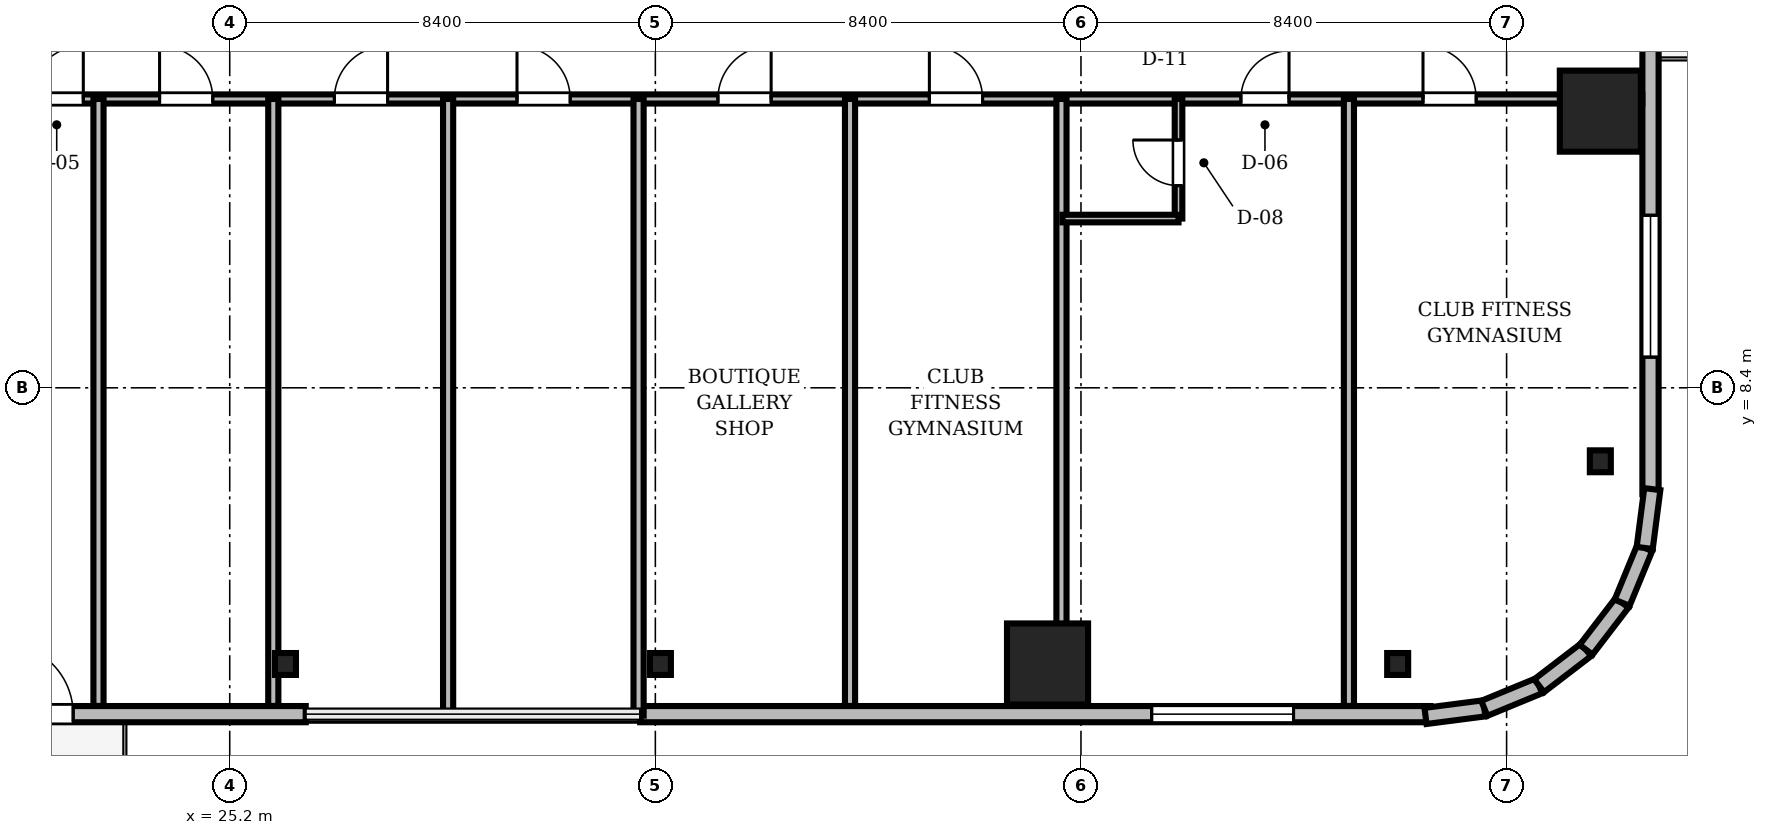
"""IFC4 building model, lengths in metres.
Left out: names, types, materials, properties, quantities, classifications, styles, units other than length and angle.
Written with IfcOpenShell. Run it as: python <this file> out.ifc"""

import sys

from ifc_helpers import new_model, si_unit, direction, frame, frame_2d, origin, origin_2d, place, context, subcontext, project, spatial, rectangle, i_section, extrude, source, transform, mapped, element, fill, save


model = new_model("IFC4")
c1 = context("Model", 3, precision=1e-05, world=origin(), true_north=direction((0.0, 1.0)))
c2 = subcontext(c1, "Body", "Model", "MODEL_VIEW")
j1 = project(units=[si_unit("LENGTHUNIT", "METRE"), si_unit("PLANEANGLEUNIT", "RADIAN")], contexts=[c1])
p1 = place(None, origin())
s1 = spatial("IfcSite", under=j1, at=p1, CompositionType="ELEMENT")
p2 = place(p1, origin())
s2 = spatial("IfcBuilding", under=s1, at=p2, CompositionType="ELEMENT")
p3 = place(p2, frame((0.0, 0.0, 126.1)))
s3 = spatial("IfcBuildingStorey", under=s2, at=p3, CompositionType="ELEMENT", Elevation=126.1)
m1 = source(origin(), c2, "Body", "SweptSolid", [
    extrude(rectangle(XDim=1.6, YDim=1.6, at=origin_2d()), origin(), (0.0, 0.0, 1.0), 3.46),
])
for number, where, z_axis, x_axis in (
    (1, (41.34, 2.95, 0.0), (0.0, 0.0, 1.0), (1.0, 0.0, 0.0)),
    (2, (52.25, 13.86, 0.0), (0.0, 0.0, 1.0), (1.0, 0.0, 0.0)),
):
    element("IfcColumn", number, at=place(p3, frame(where, z_axis=z_axis, x_axis=x_axis)), inside=s3, PredefinedType="COLUMN", context=c2, shape_type="MappedRepresentation", body=[
        mapped(m1, transform((0.0, 0.0, 0.0), scale=1.0)),
    ])
m2 = source(origin(), c2, "Body", "SweptSolid", [
    extrude(i_section(OverallWidth=0.414, OverallDepth=0.432, WebThickness=0.026, FlangeThickness=0.04, FilletRadius=0.015, at=origin_2d()), origin(), (0.0, 0.0, 1.0), 3.46),
])
for number, where, z_axis, x_axis in (
    (3, (26.3, 2.95, 0.0), (0.0, 0.0, 1.0), (1.0, 0.0, 0.0)),
    (4, (33.7, 2.95, 0.0), (0.0, 0.0, 1.0), (1.0, 0.0, 0.0)),
    (5, (48.25, 2.95, 0.0), (0.0, 0.0, 1.0), (1.0, 0.0, 0.0)),
    (6, (52.25, 6.95, 0.0), (0.0, 0.0, 1.0), (1.0, 0.0, 0.0)),
):
    element("IfcColumn", number, at=place(p3, frame(where, z_axis=z_axis, x_axis=x_axis)), inside=s3, PredefinedType="COLUMN", context=c2, shape_type="MappedRepresentation", body=[
        mapped(m2, transform((0.0, 0.0, 0.0), scale=1.0)),
    ])
m3 = source(origin(), c2, "Body", "SweptSolid", [
    extrude(rectangle(XDim=15.6, YDim=0.32, at=frame_2d((7.8, 0.0))), origin(), (0.0, 0.0, 1.0), 3.46),
])
p4 = place(p3, frame((11.1, 1.96, 0.0), z_axis=(0.0, 0.0, 1.0), x_axis=(1.0, 0.0, 0.0)))
e7 = element("IfcWall", 7, at=p4, inside=s3, PredefinedType="SOLIDWALL", context=c2, shape_type="MappedRepresentation", body=[
    mapped(m3, transform((0.0, 0.0, 0.0), scale=1.0)),
])
m4 = source(origin(), c2, "Body", "SweptSolid", [
    extrude(rectangle(XDim=1.4, YDim=2.3, at=frame_2d((0.7, 1.15))), frame((0.0, 0.17, 0.0), z_axis=(0.0, -1.0, 0.0), x_axis=(1.0, 0.0, 0.0)), (0.0, 0.0, 1.0), 0.34),
])
p5 = place(p4, frame((9.61, 0.0, 0.0)))
e8 = element("IfcOpeningElement", 8, at=p5, cuts=e7, PredefinedType="OPENING", context=c2, shape_type="MappedRepresentation", body=[
    mapped(m4, transform((0.0, 0.0, 0.0), scale=1.0)),
])
m5 = source(origin(), c2, "Body", "SweptSolid", [
    extrude(rectangle(XDim=2.8, YDim=2.4, at=frame_2d((1.4, 1.2))), frame((0.0, 0.17, 0.0), z_axis=(0.0, -1.0, 0.0), x_axis=(1.0, 0.0, 0.0)), (0.0, 0.0, 1.0), 0.34),
])
p6 = place(p4, frame((2.705, 0.0, 0.72)))
e9 = element("IfcOpeningElement", 9, at=p6, cuts=e7, PredefinedType="OPENING", context=c2, shape_type="MappedRepresentation", body=[
    mapped(m5, transform((0.0, 0.0, 0.0), scale=1.0)),
])
p7 = place(p3, frame((33.3, 1.96, 0.0), z_axis=(0.0, 0.0, 1.0), x_axis=(1.0, 0.0, 0.0)))
e10 = element("IfcWall", 10, at=p7, inside=s3, PredefinedType="SOLIDWALL", context=c2, shape_type="MappedRepresentation", body=[
    mapped(m3, transform((0.0, 0.0, 0.0), scale=1.0)),
])
p8 = place(p7, frame((10.095, 0.0, 0.72)))
e11 = element("IfcOpeningElement", 11, at=p8, cuts=e10, PredefinedType="OPENING", context=c2, shape_type="MappedRepresentation", body=[
    mapped(m5, transform((0.0, 0.0, 0.0), scale=1.0)),
])
p9 = place(p3, frame((53.24, 6.3, 0.0), z_axis=(0.0, 0.0, 1.0), x_axis=(0.0, 1.0, 0.0)))
e12 = element("IfcWall", 12, at=p9, inside=s3, PredefinedType="SOLIDWALL", context=c2, shape_type="MappedRepresentation", body=[
    mapped(m3, transform((0.0, 0.0, 0.0), scale=1.0)),
])
p10 = place(p9, frame((9.61, 0.0, 0.0)))
e13 = element("IfcOpeningElement", 13, at=p10, cuts=e12, PredefinedType="OPENING", context=c2, shape_type="MappedRepresentation", body=[
    mapped(m4, transform((0.0, 0.0, 0.0), scale=1.0)),
])
p11 = place(p9, frame((2.705, 0.0, 0.72)))
e14 = element("IfcOpeningElement", 14, at=p11, cuts=e12, PredefinedType="OPENING", context=c2, shape_type="MappedRepresentation", body=[
    mapped(m5, transform((0.0, 0.0, 0.0), scale=1.0)),
])
m6 = source(origin(), c2, "Body", "SweptSolid", [
    extrude(rectangle(XDim=1.17, YDim=0.32, at=frame_2d((0.585, 0.0))), origin(), (0.0, 0.0, 1.0), 3.46),
])
p12 = place(p3, frame((48.8, 1.925, 0.0), z_axis=(0.0, 0.0, 1.0), x_axis=(0.991762485493, 0.128090485085, 0.0)))
e15 = element("IfcWall", 15, at=p12, inside=s3, PredefinedType="SOLIDWALL", context=c2, shape_type="MappedRepresentation", body=[
    mapped(m6, transform((0.0, 0.0, 0.0), scale=1.0)),
])
m7 = source(origin(), c2, "Body", "SweptSolid", [
    extrude(rectangle(XDim=1.169, YDim=0.32, at=frame_2d((0.585, 0.0))), origin(), (0.0, 0.0, 1.0), 3.46),
])
p13 = place(p3, frame((49.96, 2.074, 0.0), z_axis=(0.0, 0.0, 1.0), x_axis=(0.924479075121, 0.381232789334, 0.0)))
e16 = element("IfcWall", 16, at=p13, inside=s3, PredefinedType="SOLIDWALL", context=c2, shape_type="MappedRepresentation", body=[
    mapped(m7, transform((0.0, 0.0, 0.0), scale=1.0)),
])
m8 = source(origin(), c2, "Body", "SweptSolid", [
    extrude(rectangle(XDim=1.169, YDim=0.32, at=frame_2d((0.584, 0.0))), origin(), (0.0, 0.0, 1.0), 3.46),
])
p14 = place(p3, frame((51.041, 2.52, 0.0), z_axis=(0.0, 0.0, 1.0), x_axis=(0.793663520347, 0.608356981114, 0.0)))
e17 = element("IfcWall", 17, at=p14, inside=s3, PredefinedType="SOLIDWALL", context=c2, shape_type="MappedRepresentation", body=[
    mapped(m8, transform((0.0, 0.0, 0.0), scale=1.0)),
])
m9 = source(origin(), c2, "Body", "SweptSolid", [
    extrude(rectangle(XDim=1.169, YDim=0.32, at=frame_2d((0.584, 0.0))), origin(), (0.0, 0.0, 1.0), 3.46),
])
for number, where, z_axis, x_axis in (
    (18, (51.969, 3.231, 0.0), (0.0, 0.0, 1.0), (0.608, 0.794, 0.0)),
    (19, (52.68, 4.159, 0.0), (0.0, 0.0, 1.0), (0.381, 0.925, 0.0)),
):
    element("IfcWall", number, at=place(p3, frame(where, z_axis=z_axis, x_axis=x_axis)), inside=s3, PredefinedType="SOLIDWALL", context=c2, shape_type="MappedRepresentation", body=[
        mapped(m9, transform((0.0, 0.0, 0.0), scale=1.0)),
    ])
m10 = source(origin(), c2, "Body", "SweptSolid", [
    extrude(rectangle(XDim=1.171, YDim=0.32, at=frame_2d((0.585, 0.0))), origin(), (0.0, 0.0, 1.0), 3.46),
])
p15 = place(p3, frame((53.125, 5.24, 0.0), z_axis=(0.0, 0.0, 1.0), x_axis=(0.128269133229, 0.991739395941, 0.0)))
e20 = element("IfcWall", 20, at=p15, inside=s3, PredefinedType="SOLIDWALL", context=c2, shape_type="MappedRepresentation", body=[
    mapped(m10, transform((0.0, 0.0, 0.0), scale=1.0)),
])
m11 = source(origin(), c2, "Body", "SweptSolid", [
    extrude(rectangle(XDim=46.156, YDim=0.18, at=frame_2d((23.078, 0.0))), origin(), (0.0, 0.0, 1.0), 2.702),
])
p16 = place(p3, frame((6.922, 14.1, 0.0), z_axis=(0.0, 0.0, 1.0), x_axis=(1.0, 0.0, 0.0)))
e21 = element("IfcWall", 21, at=p16, inside=s3, PredefinedType="PARTITIONING", context=c2, shape_type="MappedRepresentation", body=[
    mapped(m11, transform((0.0, 0.0, 0.0), scale=1.0)),
])
m12 = source(origin(), c2, "Body", "SweptSolid", [
    extrude(rectangle(XDim=1.05, YDim=2.2, at=frame_2d((0.525, 1.1))), frame((0.0, 0.1, 0.0), z_axis=(0.0, -1.0, 0.0), x_axis=(1.0, 0.0, 0.0)), (0.0, 0.0, 1.0), 0.2),
])
p17 = place(p16, frame((14.338, 0.0, 0.0)))
e22 = element("IfcOpeningElement", 22, at=p17, cuts=e21, PredefinedType="OPENING", context=c2, shape_type="MappedRepresentation", body=[
    mapped(m12, transform((0.0, 0.0, 0.0), scale=1.0)),
])
p18 = place(p16, frame((16.893, 0.0, 0.0)))
e23 = element("IfcOpeningElement", 23, at=p18, cuts=e21, PredefinedType="OPENING", context=c2, shape_type="MappedRepresentation", body=[
    mapped(m12, transform((0.0, 0.0, 0.0), scale=1.0)),
])
p19 = place(p16, frame((20.344, 0.0, 0.0)))
e24 = element("IfcOpeningElement", 24, at=p19, cuts=e21, PredefinedType="OPENING", context=c2, shape_type="MappedRepresentation", body=[
    mapped(m12, transform((0.0, 0.0, 0.0), scale=1.0)),
])
p20 = place(p16, frame((23.948, 0.0, 0.0)))
e25 = element("IfcOpeningElement", 25, at=p20, cuts=e21, PredefinedType="OPENING", context=c2, shape_type="MappedRepresentation", body=[
    mapped(m12, transform((0.0, 0.0, 0.0), scale=1.0)),
])
p21 = place(p16, frame((27.913, 0.0, 0.0)))
e26 = element("IfcOpeningElement", 26, at=p21, cuts=e21, PredefinedType="OPENING", context=c2, shape_type="MappedRepresentation", body=[
    mapped(m12, transform((0.0, 0.0, 0.0), scale=1.0)),
])
p22 = place(p16, frame((32.086, 0.0, 0.0)))
e27 = element("IfcOpeningElement", 27, at=p22, cuts=e21, PredefinedType="OPENING", context=c2, shape_type="MappedRepresentation", body=[
    mapped(m12, transform((0.0, 0.0, 0.0), scale=1.0)),
])
m13 = source(origin(), c2, "Body", "SweptSolid", [
    extrude(rectangle(XDim=0.95, YDim=2.15, at=frame_2d((0.475, 1.075))), frame((0.0, 0.1, 0.0), z_axis=(0.0, -1.0, 0.0), x_axis=(1.0, 0.0, 0.0)), (0.0, 0.0, 1.0), 0.2),
])
p23 = place(p16, frame((38.234, 0.0, 0.0)))
e28 = element("IfcOpeningElement", 28, at=p23, cuts=e21, PredefinedType="OPENING", context=c2, shape_type="MappedRepresentation", body=[
    mapped(m13, transform((0.0, 0.0, 0.0), scale=1.0)),
])
p24 = place(p16, frame((41.828, 0.0, 0.0)))
e29 = element("IfcOpeningElement", 29, at=p24, cuts=e21, PredefinedType="OPENING", context=c2, shape_type="MappedRepresentation", body=[
    mapped(m12, transform((0.0, 0.0, 0.0), scale=1.0)),
])
m14 = source(origin(), c2, "Body", "SweptSolid", [
    extrude(rectangle(XDim=2.36, YDim=0.15, at=frame_2d((1.18, 0.0))), origin(), (0.0, 0.0, 1.0), 3.122),
])
p25 = place(p3, frame((43.925, 11.74, 0.0), z_axis=(0.0, 0.0, 1.0), x_axis=(0.0, 1.0, 0.0)))
e30 = element("IfcWall", 30, at=p25, inside=s3, PredefinedType="PARTITIONING", context=c2, shape_type="MappedRepresentation", body=[
    mapped(m14, transform((0.0, 0.0, 0.0), scale=1.0)),
])
m15 = source(origin(), c2, "Body", "SweptSolid", [
    extrude(rectangle(XDim=0.9, YDim=2.1, at=frame_2d((0.45, 1.05))), frame((0.0, 0.085, 0.0), z_axis=(0.0, -1.0, 0.0), x_axis=(1.0, 0.0, 0.0)), (0.0, 0.0, 1.0), 0.17),
])
p26 = place(p25, frame((0.65, 0.0, 0.0)))
e31 = element("IfcOpeningElement", 31, at=p26, cuts=e30, PredefinedType="OPENING", context=c2, shape_type="MappedRepresentation", body=[
    mapped(m15, transform((0.0, 0.0, 0.0), scale=1.0)),
])
m16 = source(origin(), c2, "Body", "SweptSolid", [
    extrude(rectangle(XDim=11.978, YDim=0.2, at=frame_2d((5.989, 0.0))), origin(), (0.0, 0.0, 1.0), 2.702),
])
for number, where, z_axis, x_axis in (
    (32, (22.61, 2.122, 0.0), (0.0, 0.0, 1.0), (0.0, 1.0, 0.0)),
    (33, (26.06, 2.122, 0.0), (0.0, 0.0, 1.0), (0.0, 1.0, 0.0)),
):
    element("IfcWall", number, at=place(p3, frame(where, z_axis=z_axis, x_axis=x_axis)), inside=s3, PredefinedType="PARTITIONING", context=c2, shape_type="MappedRepresentation", body=[
        mapped(m16, transform((0.0, 0.0, 0.0), scale=1.0)),
    ])
m17 = source(origin(), c2, "Body", "SweptSolid", [
    extrude(rectangle(XDim=12.17, YDim=0.2, at=frame_2d((6.085, 0.0))), origin(), (0.0, 0.0, 1.0), 2.702),
])
for number, where, z_axis, x_axis in (
    (34, (29.51, 1.93, 0.0), (0.0, 0.0, 1.0), (0.0, 1.0, 0.0)),
    (35, (33.269, 1.93, 0.0), (0.0, 0.0, 1.0), (0.0, 1.0, 0.0)),
):
    element("IfcWall", number, at=place(p3, frame(where, z_axis=z_axis, x_axis=x_axis)), inside=s3, PredefinedType="PARTITIONING", context=c2, shape_type="MappedRepresentation", body=[
        mapped(m17, transform((0.0, 0.0, 0.0), scale=1.0)),
    ])
for number, where, z_axis, x_axis in (
    (36, (37.442, 2.122, 0.0), (0.0, 0.0, 1.0), (0.0, 1.0, 0.0)),
    (37, (41.615, 2.122, 0.0), (0.0, 0.0, 1.0), (0.0, 1.0, 0.0)),
    (38, (47.288, 2.122, 0.0), (0.0, 0.0, 1.0), (0.0, 1.0, 0.0)),
):
    element("IfcWall", number, at=place(p3, frame(where, z_axis=z_axis, x_axis=x_axis)), inside=s3, PredefinedType="PARTITIONING", context=c2, shape_type="MappedRepresentation", body=[
        mapped(m16, transform((0.0, 0.0, 0.0), scale=1.0)),
    ])
m18 = source(origin(), c2, "Body", "SweptSolid", [
    extrude(rectangle(XDim=2.29, YDim=0.15, at=frame_2d((1.145, 0.0))), origin(), (0.0, 0.0, 1.0), 3.46),
])
p27 = place(p3, frame((41.635, 11.74, 0.0), z_axis=(0.0, 0.0, 1.0), x_axis=(1.0, 0.0, 0.0)))
e39 = element("IfcWall", 39, at=p27, inside=s3, PredefinedType="PARTITIONING", context=c2, shape_type="MappedRepresentation", body=[
    mapped(m18, transform((0.0, 0.0, 0.0), scale=1.0)),
])
m19 = source(origin(), c2, "Body", "SweptSolid", [
    extrude(rectangle(XDim=1.4, YDim=2.3, at=frame_2d((0.7, 1.15))), frame((0.0, 0.025, 0.0), z_axis=(0.0, -1.0, 0.0), x_axis=(1.0, 0.0, 0.0)), (0.0, 0.0, 1.0), 0.05),
])
p28 = place(p5, frame((1.4, 0.0, 0.0), z_axis=(0.0, 0.0, 1.0), x_axis=(-1.0, 0.0, 0.0)))
e40 = element("IfcDoor", 40, at=p28, inside=s3, OperationType="DOUBLE_DOOR_SLIDING", PredefinedType="DOOR", context=c2, shape_type="MappedRepresentation", body=[
    mapped(m19, transform((0.0, 0.0, 0.0), scale=1.0)),
])
fill(e8, e40)
m20 = source(origin(), c2, "Body", "SweptSolid", [
    extrude(rectangle(XDim=2.8, YDim=2.4, at=frame_2d((1.4, 1.2))), frame((0.0, 0.03, 0.0), z_axis=(0.0, -1.0, 0.0), x_axis=(1.0, 0.0, 0.0)), (0.0, 0.0, 1.0), 0.06),
])
p29 = place(p8, origin())
e41 = element("IfcWindow", 41, at=p29, inside=s3, PartitioningType="SINGLE_PANEL", PredefinedType="WINDOW", context=c2, shape_type="MappedRepresentation", body=[
    mapped(m20, transform((0.0, 0.0, 0.0), scale=1.0)),
])
fill(e11, e41)
p30 = place(p11, origin())
e42 = element("IfcWindow", 42, at=p30, inside=s3, PartitioningType="SINGLE_PANEL", PredefinedType="WINDOW", context=c2, shape_type="MappedRepresentation", body=[
    mapped(m20, transform((0.0, 0.0, 0.0), scale=1.0)),
])
fill(e14, e42)
m21 = source(origin(), c2, "Body", "SweptSolid", [
    extrude(rectangle(XDim=1.05, YDim=2.2, at=frame_2d((0.525, 1.1))), frame((0.0, 0.025, 0.0), z_axis=(0.0, -1.0, 0.0), x_axis=(1.0, 0.0, 0.0)), (0.0, 0.0, 1.0), 0.05),
])
p31 = place(p17, origin())
e43 = element("IfcDoor", 43, at=p31, inside=s3, OperationType="SINGLE_SWING_RIGHT", PredefinedType="DOOR", context=c2, shape_type="MappedRepresentation", body=[
    mapped(m21, transform((0.0, 0.0, 0.0), scale=1.0)),
])
fill(e22, e43)
p32 = place(p18, origin())
e44 = element("IfcDoor", 44, at=p32, inside=s3, OperationType="SINGLE_SWING_LEFT", PredefinedType="DOOR", context=c2, shape_type="MappedRepresentation", body=[
    mapped(m21, transform((0.0, 0.0, 0.0), scale=1.0)),
])
fill(e23, e44)
p33 = place(p19, origin())
e45 = element("IfcDoor", 45, at=p33, inside=s3, OperationType="SINGLE_SWING_RIGHT", PredefinedType="DOOR", context=c2, shape_type="MappedRepresentation", body=[
    mapped(m21, transform((0.0, 0.0, 0.0), scale=1.0)),
])
fill(e24, e45)
p34 = place(p20, origin())
e46 = element("IfcDoor", 46, at=p34, inside=s3, OperationType="SINGLE_SWING_LEFT", PredefinedType="DOOR", context=c2, shape_type="MappedRepresentation", body=[
    mapped(m21, transform((0.0, 0.0, 0.0), scale=1.0)),
])
fill(e25, e46)
p35 = place(p21, origin())
e47 = element("IfcDoor", 47, at=p35, inside=s3, OperationType="SINGLE_SWING_RIGHT", PredefinedType="DOOR", context=c2, shape_type="MappedRepresentation", body=[
    mapped(m21, transform((0.0, 0.0, 0.0), scale=1.0)),
])
fill(e26, e47)
p36 = place(p22, origin())
e48 = element("IfcDoor", 48, at=p36, inside=s3, OperationType="SINGLE_SWING_LEFT", PredefinedType="DOOR", context=c2, shape_type="MappedRepresentation", body=[
    mapped(m21, transform((0.0, 0.0, 0.0), scale=1.0)),
])
fill(e27, e48)
m22 = source(origin(), c2, "Body", "SweptSolid", [
    extrude(rectangle(XDim=0.95, YDim=2.15, at=frame_2d((0.475, 1.075))), frame((0.0, 0.025, 0.0), z_axis=(0.0, -1.0, 0.0), x_axis=(1.0, 0.0, 0.0)), (0.0, 0.0, 1.0), 0.05),
])
p37 = place(p23, origin())
e49 = element("IfcDoor", 49, at=p37, inside=s3, OperationType="SINGLE_SWING_RIGHT", PredefinedType="DOOR", context=c2, shape_type="MappedRepresentation", body=[
    mapped(m22, transform((0.0, 0.0, 0.0), scale=1.0)),
])
fill(e28, e49)
p38 = place(p24, origin())
e50 = element("IfcDoor", 50, at=p38, inside=s3, OperationType="SINGLE_SWING_LEFT", PredefinedType="DOOR", context=c2, shape_type="MappedRepresentation", body=[
    mapped(m21, transform((0.0, 0.0, 0.0), scale=1.0)),
])
fill(e29, e50)
m23 = source(origin(), c2, "Body", "SweptSolid", [
    extrude(rectangle(XDim=0.9, YDim=2.1, at=frame_2d((0.45, 1.05))), frame((0.0, 0.025, 0.0), z_axis=(0.0, -1.0, 0.0), x_axis=(1.0, 0.0, 0.0)), (0.0, 0.0, 1.0), 0.05),
])
p39 = place(p26, origin())
e51 = element("IfcDoor", 51, at=p39, inside=s3, OperationType="SINGLE_SWING_RIGHT", PredefinedType="DOOR", context=c2, shape_type="MappedRepresentation", body=[
    mapped(m23, transform((0.0, 0.0, 0.0), scale=1.0)),
])
fill(e31, e51)
save(model, sys.argv[1])
